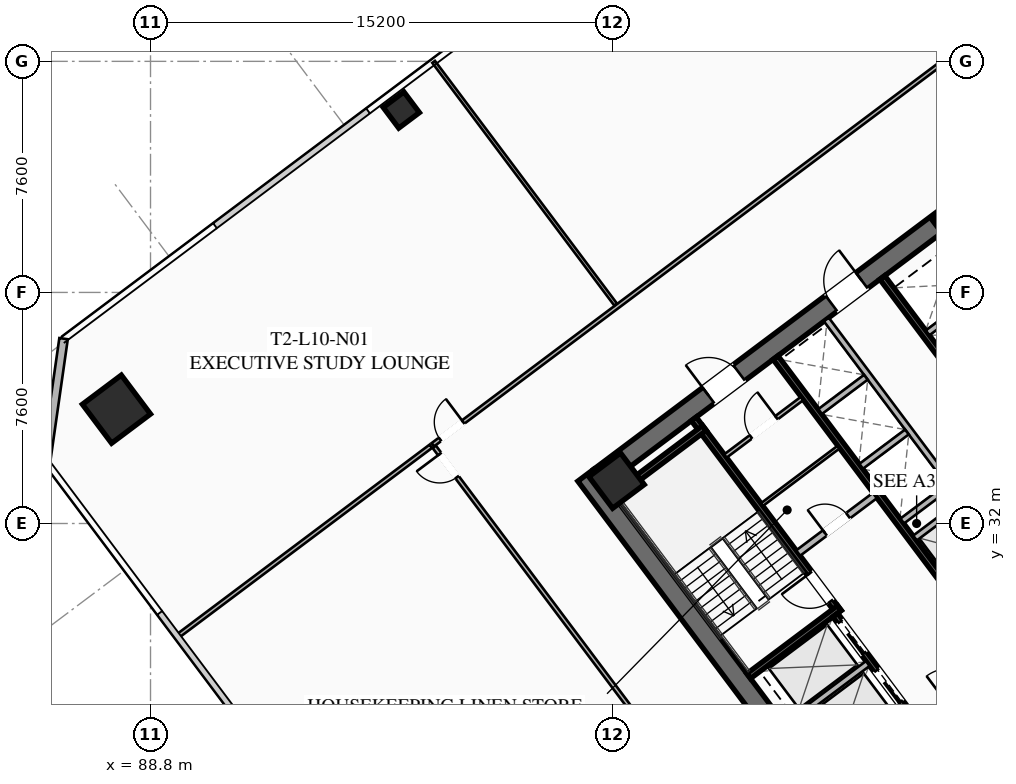
"""IFC4 building model, lengths in metres.
Left out: names, types, materials, properties, quantities, classifications, styles, units other than length and angle.
Written with IfcOpenShell. Run it as: python <this file> out.ifc"""

import sys

from ifc_helpers import new_model, si_unit, direction, frame, frame_2d, origin, origin_2d, place, context, subcontext, project, spatial, rectangle, hollow_rectangle, extrude, element, fill, save


model = new_model("IFC4")
c1 = context("Model", 3, precision=1e-05, world=origin(), true_north=direction((0.0, 1.0)))
c2 = subcontext(c1, "Body", "Model", "MODEL_VIEW")
j1 = project(units=[si_unit("LENGTHUNIT", "METRE"), si_unit("PLANEANGLEUNIT", "RADIAN")], contexts=[c1])
p1 = place(None, origin())
s1 = spatial("IfcSite", under=j1, at=p1, CompositionType="ELEMENT")
p2 = place(p1, origin())
s2 = spatial("IfcBuilding", under=s1, at=p2, CompositionType="ELEMENT")
p3 = place(p2, frame((0.0, 0.0, 42.35)))
s3 = spatial("IfcBuildingStorey", under=s2, at=p3, CompositionType="ELEMENT", Elevation=42.35)
p4 = place(p3, frame((112.476, 21.107, 0.0), z_axis=(0.0, 0.0, 1.0), x_axis=(-0.600005007985, 0.799996243986, 0.0)))
e1 = element("IfcWall", 1, at=p4, inside=s3, PredefinedType="SHEAR", context=c2, shape_type="SweptSolid", body=[
    extrude(rectangle(XDim=15.6, YDim=0.65, at=frame_2d((7.8, 0.0))), origin(), (0.0, 0.0, 1.0), 3.55),
])
p5 = place(p3, frame((124.429, 30.478, 0.0), z_axis=(0.0, 0.0, 1.0), x_axis=(-0.799998028465, -0.600002628705, 0.0)))
e2 = element("IfcWall", 2, at=p5, inside=s3, PredefinedType="SHEAR", context=c2, shape_type="SweptSolid", body=[
    extrude(rectangle(XDim=14.86, YDim=0.65, at=frame_2d((7.43, 0.0))), origin(), (0.0, 0.0, 1.0), 3.55),
])
p6 = place(p5, frame((9.13, 0.0, 0.0)))
e3 = element("IfcOpeningElement", 3, at=p6, cuts=e2, PredefinedType="OPENING", context=c2, shape_type="SweptSolid", body=[
    extrude(rectangle(XDim=1.25, YDim=2.25, at=frame_2d((0.625, 1.125))), frame((0.0, 0.335, 0.0), z_axis=(0.0, -1.0, 0.0), x_axis=(1.0, 0.0, 0.0)), (0.0, 0.0, 1.0), 0.67),
])
p7 = place(p5, frame((4.08, 0.0, 0.0)))
e4 = element("IfcOpeningElement", 4, at=p7, cuts=e2, PredefinedType="OPENING", context=c2, shape_type="SweptSolid", body=[
    extrude(rectangle(XDim=1.25, YDim=2.25, at=frame_2d((0.625, 1.125))), frame((0.0, 0.335, 0.0), z_axis=(0.0, -1.0, 0.0), x_axis=(1.0, 0.0, 0.0)), (0.0, 0.0, 1.0), 0.67),
])
p8 = place(p3, frame((103.571, 33.522, 0.0), z_axis=(0.0, 0.0, 1.0), x_axis=(0.799998028465, 0.600002628705, 0.0)))
e5 = element("IfcWall", 5, at=p8, inside=s3, PredefinedType="SHEAR", context=c2, shape_type="SweptSolid", body=[
    extrude(rectangle(XDim=14.86, YDim=0.65, at=frame_2d((7.43, 0.0))), origin(), (0.0, 0.0, 1.0), 3.55),
])
p9 = place(p8, frame((4.48, 0.0, 0.0)))
e6 = element("IfcOpeningElement", 6, at=p9, cuts=e5, PredefinedType="OPENING", context=c2, shape_type="SweptSolid", body=[
    extrude(rectangle(XDim=1.25, YDim=2.25, at=frame_2d((0.625, 1.125))), frame((0.0, 0.335, 0.0), z_axis=(0.0, -1.0, 0.0), x_axis=(1.0, 0.0, 0.0)), (0.0, 0.0, 1.0), 0.67),
])
p10 = place(p8, frame((9.53, 0.0, 0.0)))
e7 = element("IfcOpeningElement", 7, at=p10, cuts=e5, PredefinedType="OPENING", context=c2, shape_type="SweptSolid", body=[
    extrude(rectangle(XDim=1.25, YDim=2.25, at=frame_2d((0.625, 1.125))), frame((0.0, 0.335, 0.0), z_axis=(0.0, -1.0, 0.0), x_axis=(1.0, 0.0, 0.0)), (0.0, 0.0, 1.0), 0.67),
])
for number, where, z_axis, x_axis in (
    (8, (115.41, 41.87, 0.0), (0.0, 0.0, 1.0), (0.8, 0.6, 0.0)),
    (9, (104.13, 33.41, 0.0), (0.0, 0.0, 1.0), (0.8, 0.6, 0.0)),
):
    element("IfcColumn", number, at=place(p3, frame(where, z_axis=z_axis, x_axis=x_axis)), inside=s3, PredefinedType="COLUMN", context=c2, shape_type="SweptSolid", body=[
        extrude(hollow_rectangle(XDim=1.3, YDim=1.3, WallThickness=0.05, at=origin_2d()), origin(), (0.0, 0.0, 1.0), 3.35),
    ])
p11 = place(p3, frame((87.68, 35.76, 0.0), z_axis=(0.0, 0.0, 1.0), x_axis=(0.799999996291, 0.600000004945, 0.0)))
e10 = element("IfcColumn", 10, at=p11, inside=s3, PredefinedType="COLUMN", context=c2, shape_type="SweptSolid", body=[
    extrude(hollow_rectangle(XDim=1.6, YDim=1.6, WallThickness=0.06, at=origin_2d()), origin(), (0.0, 0.0, 1.0), 3.35),
])
p12 = place(p3, frame((97.05, 45.6, 0.0), z_axis=(0.0, 0.0, 1.0), x_axis=(0.799999996291, 0.600000004945, 0.0)))
e11 = element("IfcColumn", 11, at=p12, inside=s3, PredefinedType="COLUMN", context=c2, shape_type="SweptSolid", body=[
    extrude(hollow_rectangle(XDim=0.85, YDim=0.85, WallThickness=0.035, at=origin_2d()), origin(), (0.0, 0.0, 1.0), 3.35),
])
p13 = place(p3, frame((85.36, 34.02, 0.0), z_axis=(0.0, 0.0, 1.0), x_axis=(0.14137968631, 0.989955445613, 0.0)))
e12 = element("IfcWall", 12, at=p13, inside=s3, PredefinedType="SOLIDWALL", context=c2, shape_type="SweptSolid", body=[
    extrude(rectangle(XDim=4.101, YDim=0.28, at=frame_2d((2.051, 0.0))), origin(), (0.0, 0.0, 1.0), 3.35),
])
p14 = place(p3, frame((111.44, 29.08, 0.0), z_axis=(0.0, 0.0, 1.0), x_axis=(-0.600009827119, 0.799992629566, 0.0)))
e13 = element("IfcWall", 13, at=p14, inside=s3, PredefinedType="SHEAR", context=c2, shape_type="SweptSolid", body=[
    extrude(rectangle(XDim=7.95, YDim=0.2, at=frame_2d((3.975, 0.0))), origin(), (0.0, 0.0, 1.0), 3.35),
])
p15 = place(p14, frame((0.45, 0.0, 0.0)))
e14 = element("IfcOpeningElement", 14, at=p15, cuts=e13, PredefinedType="OPENING", context=c2, shape_type="SweptSolid", body=[
    extrude(rectangle(XDim=1.15, YDim=2.2, at=frame_2d((0.575, 1.1))), frame((0.0, 0.11, 0.0), z_axis=(0.0, -1.0, 0.0), x_axis=(1.0, 0.0, 0.0)), (0.0, 0.0, 1.0), 0.22),
])
for number, where, z_axis, x_axis in (
    (15, (108.476, 26.982, 0.0), (0.0, 0.0, 1.0), (0.8, 0.6, 0.0)),
    (16, (104.036, 32.902, 0.0), (0.0, 0.0, 1.0), (0.8, 0.6, 0.0)),
):
    element("IfcWall", number, at=place(p3, frame(where, z_axis=z_axis, x_axis=x_axis)), inside=s3, PredefinedType="SHEAR", context=c2, shape_type="SweptSolid", body=[
        extrude(rectangle(XDim=3.73, YDim=0.2, at=frame_2d((1.865, 0.0))), origin(), (0.0, 0.0, 1.0), 3.35),
    ])
p16 = place(p3, frame((117.938, 26.016, 0.0), z_axis=(0.0, 0.0, 1.0), x_axis=(-0.600005463273, 0.799995902516, 0.0)))
e17 = element("IfcWall", 17, at=p16, inside=s3, PredefinedType="SHEAR", context=c2, shape_type="SweptSolid", body=[
    extrude(rectangle(XDim=14.3, YDim=0.2, at=frame_2d((7.15, 0.0))), origin(), (0.0, 0.0, 1.0), 3.35),
])
p17 = place(p3, frame((110.104, 31.028, 0.0), z_axis=(0.0, 0.0, 1.0), x_axis=(0.800018601094, 0.59997519774, 0.0)))
e18 = element("IfcWall", 18, at=p17, inside=s3, PredefinedType="SOLIDWALL", context=c2, shape_type="SweptSolid", body=[
    extrude(rectangle(XDim=3.15, YDim=0.22, at=frame_2d((1.575, 0.0))), origin(), (0.0, 0.0, 1.0), 2.703),
])
p18 = place(p17, frame((1.1, 0.0, 0.0)))
e19 = element("IfcOpeningElement", 19, at=p18, cuts=e18, PredefinedType="OPENING", context=c2, shape_type="SweptSolid", body=[
    extrude(rectangle(XDim=0.95, YDim=2.05, at=frame_2d((0.475, 1.025))), frame((0.0, 0.12, 0.0), z_axis=(0.0, -1.0, 0.0), x_axis=(1.0, 0.0, 0.0)), (0.0, 0.0, 1.0), 0.24),
])
p19 = place(p3, frame((114.316, 25.412, 0.0), z_axis=(0.0, 0.0, 1.0), x_axis=(0.800018601094, 0.59997519774, 0.0)))
e20 = element("IfcWall", 20, at=p19, inside=s3, PredefinedType="SOLIDWALL", context=c2, shape_type="SweptSolid", body=[
    extrude(rectangle(XDim=3.15, YDim=0.22, at=frame_2d((1.575, 0.0))), origin(), (0.0, 0.0, 1.0), 2.703),
])
p20 = place(p19, frame((0.95, 0.0, 0.0)))
e21 = element("IfcOpeningElement", 21, at=p20, cuts=e20, PredefinedType="OPENING", context=c2, shape_type="SweptSolid", body=[
    extrude(rectangle(XDim=1.25, YDim=2.25, at=frame_2d((0.625, 1.125))), frame((0.0, 0.12, 0.0), z_axis=(0.0, -1.0, 0.0), x_axis=(1.0, 0.0, 0.0)), (0.0, 0.0, 1.0), 0.24),
])
p21 = place(p3, frame((115.13, 23.91, 0.0), z_axis=(0.0, 0.0, 1.0), x_axis=(-0.599975393228, 0.800018454488, 0.0)))
e22 = element("IfcWall", 22, at=p21, inside=s3, PredefinedType="SHEAR", context=c2, shape_type="SweptSolid", body=[
    extrude(rectangle(XDim=6.35, YDim=0.2, at=frame_2d((3.175, 0.0))), origin(), (0.0, 0.0, 1.0), 3.35),
])
p22 = place(p21, frame((4.775, 0.0, 0.0)))
e23 = element("IfcOpeningElement", 23, at=p22, cuts=e22, PredefinedType="OPENING", context=c2, shape_type="SweptSolid", body=[
    extrude(rectangle(XDim=1.3, YDim=2.25, at=frame_2d((0.65, 1.125))), frame((0.0, 0.11, 0.0), z_axis=(0.0, -1.0, 0.0), x_axis=(1.0, 0.0, 0.0)), (0.0, 0.0, 1.0), 0.22),
])
p23 = place(p21, frame((2.775, 0.0, 0.0)))
e24 = element("IfcOpeningElement", 24, at=p23, cuts=e22, PredefinedType="OPENING", context=c2, shape_type="SweptSolid", body=[
    extrude(rectangle(XDim=1.3, YDim=2.25, at=frame_2d((0.65, 1.125))), frame((0.0, 0.11, 0.0), z_axis=(0.0, -1.0, 0.0), x_axis=(1.0, 0.0, 0.0)), (0.0, 0.0, 1.0), 0.22),
])
p24 = place(p21, frame((0.575, 0.0, 0.0)))
e25 = element("IfcOpeningElement", 25, at=p24, cuts=e22, PredefinedType="OPENING", context=c2, shape_type="SweptSolid", body=[
    extrude(rectangle(XDim=1.3, YDim=2.25, at=frame_2d((0.65, 1.125))), frame((0.0, 0.11, 0.0), z_axis=(0.0, -1.0, 0.0), x_axis=(1.0, 0.0, 0.0)), (0.0, 0.0, 1.0), 0.22),
])
p25 = place(p3, frame((109.688, 25.366, 0.0), z_axis=(0.0, 0.0, 1.0), x_axis=(0.8, 0.6, 0.0)))
e26 = element("IfcWall", 26, at=p25, inside=s3, PredefinedType="SOLIDWALL", context=c2, shape_type="SweptSolid", body=[
    extrude(rectangle(XDim=3.38, YDim=0.2, at=frame_2d((1.69, 0.0))), origin(), (0.0, 0.0, 1.0), 3.35),
])
p26 = place(p3, frame((112.87, 40.09, 0.0), z_axis=(0.0, 0.0, 1.0), x_axis=(0.599975393228, -0.800018454488, 0.0)))
e27 = element("IfcWall", 27, at=p26, inside=s3, PredefinedType="SHEAR", context=c2, shape_type="SweptSolid", body=[
    extrude(rectangle(XDim=6.35, YDim=0.2, at=frame_2d((3.175, 0.0))), origin(), (0.0, 0.0, 1.0), 3.35),
])
p27 = place(p3, frame((114.36, 38.27, 0.0), z_axis=(0.0, 0.0, 1.0), x_axis=(0.799973995579, 0.600034670996, 0.0)))
e28 = element("IfcWall", 28, at=p27, inside=s3, PredefinedType="SOLIDWALL", context=c2, shape_type="SweptSolid", body=[
    extrude(rectangle(XDim=3.38, YDim=0.2, at=frame_2d((1.69, 0.0))), origin(), (0.0, 0.0, 1.0), 3.35),
])
p28 = place(p3, frame((107.71, 34.22, 0.0), z_axis=(0.0, 0.0, 1.0), x_axis=(0.799981399002, 0.60002480053, 0.0)))
e29 = element("IfcWall", 29, at=p28, inside=s3, PredefinedType="PARTITIONING", context=c2, shape_type="SweptSolid", body=[
    extrude(rectangle(XDim=3.15, YDim=0.135, at=frame_2d((1.575, 0.0))), origin(), (0.0, 0.0, 1.0), 2.703),
])
p29 = place(p28, frame((1.05, 0.0, 0.0)))
e30 = element("IfcOpeningElement", 30, at=p29, cuts=e29, PredefinedType="OPENING", context=c2, shape_type="SweptSolid", body=[
    extrude(rectangle(XDim=1.05, YDim=2.2, at=frame_2d((0.525, 1.1))), frame((0.0, 0.077, 0.0), z_axis=(0.0, -1.0, 0.0), x_axis=(1.0, 0.0, 0.0)), (0.0, 0.0, 1.0), 0.155),
])
p30 = place(p3, frame((108.91, 32.62, 0.0), z_axis=(0.0, 0.0, 1.0), x_axis=(0.800018601094, 0.59997519774, 0.0)))
e31 = element("IfcWall", 31, at=p30, inside=s3, PredefinedType="PARTITIONING", context=c2, shape_type="SweptSolid", body=[
    extrude(rectangle(XDim=3.15, YDim=0.11, at=frame_2d((1.575, 0.0))), origin(), (0.0, 0.0, 1.0), 2.703),
])
p31 = place(p3, frame((113.946, 31.522, 0.0), z_axis=(0.0, 0.0, 1.0), x_axis=(0.8, 0.6, 0.0)))
e32 = element("IfcWall", 32, at=p31, inside=s3, PredefinedType="SOLIDWALL", context=c2, shape_type="SweptSolid", body=[
    extrude(rectangle(XDim=1.88, YDim=0.2, at=frame_2d((0.94, 0.0))), origin(), (0.0, 0.0, 1.0), 3.35),
])
p32 = place(p3, frame((115.11, 33.27, 0.0), z_axis=(0.0, 0.0, 1.0), x_axis=(-0.600011488909, 0.79999138319, 0.0)))
e33 = element("IfcWall", 33, at=p32, inside=s3, PredefinedType="SOLIDWALL", context=c2, shape_type="SweptSolid", body=[
    extrude(rectangle(XDim=6.8, YDim=0.2, at=frame_2d((3.4, 0.0))), origin(), (0.0, 0.0, 1.0), 3.35),
])
p33 = place(p3, frame((113.526, 32.082, 0.0), z_axis=(0.0, 0.0, 1.0), x_axis=(0.800046745961, 0.599937666993, 0.0)))
e34 = element("IfcWall", 34, at=p33, inside=s3, PredefinedType="SOLIDWALL", context=c2, shape_type="SweptSolid", body=[
    extrude(rectangle(XDim=1.88, YDim=0.2, at=frame_2d((0.94, 0.0))), origin(), (0.0, 0.0, 1.0), 3.35),
])
p34 = place(p3, frame((112.176, 33.882, 0.0), z_axis=(0.0, 0.0, 1.0), x_axis=(0.8, 0.6, 0.0)))
e35 = element("IfcWall", 35, at=p34, inside=s3, PredefinedType="SOLIDWALL", context=c2, shape_type="SweptSolid", body=[
    extrude(rectangle(XDim=1.88, YDim=0.2, at=frame_2d((0.94, 0.0))), origin(), (0.0, 0.0, 1.0), 3.35),
])
p35 = place(p3, frame((110.826, 35.682, 0.0), z_axis=(0.0, 0.0, 1.0), x_axis=(0.799984418148, 0.600020775241, 0.0)))
e36 = element("IfcWall", 36, at=p35, inside=s3, PredefinedType="SOLIDWALL", context=c2, shape_type="SweptSolid", body=[
    extrude(rectangle(XDim=1.88, YDim=0.2, at=frame_2d((0.94, 0.0))), origin(), (0.0, 0.0, 1.0), 3.35),
])
p36 = place(p3, frame((98.084, 34.588, 0.0), z_axis=(0.0, 0.0, 1.0), x_axis=(0.799997053619, 0.600003928488, 0.0)))
e37 = element("IfcWall", 37, at=p36, inside=s3, PredefinedType="PARTITIONING", context=c2, shape_type="SweptSolid", body=[
    extrude(rectangle(XDim=29.83, YDim=0.135, at=frame_2d((14.915, 0.0))), origin(), (0.0, 0.0, 1.0), 2.703),
])
p37 = place(p36, frame((0.3, 0.0, 0.0)))
e38 = element("IfcOpeningElement", 38, at=p37, cuts=e37, PredefinedType="OPENING", context=c2, shape_type="SweptSolid", body=[
    extrude(rectangle(XDim=0.95, YDim=2.05, at=frame_2d((0.475, 1.025))), frame((0.0, 0.077, 0.0), z_axis=(0.0, -1.0, 0.0), x_axis=(1.0, 0.0, 0.0)), (0.0, 0.0, 1.0), 0.155),
])
p38 = place(p36, frame((28.58, 0.0, 0.0)))
e39 = element("IfcOpeningElement", 39, at=p38, cuts=e37, PredefinedType="OPENING", context=c2, shape_type="SweptSolid", body=[
    extrude(rectangle(XDim=0.95, YDim=2.05, at=frame_2d((0.475, 1.025))), frame((0.0, 0.077, 0.0), z_axis=(0.0, -1.0, 0.0), x_axis=(1.0, 0.0, 0.0)), (0.0, 0.0, 1.0), 0.155),
])
p39 = place(p3, frame((104.1, 39.2, 0.0), z_axis=(0.0, 0.0, 1.0), x_axis=(-0.599996085964, 0.800002935512, 0.0)))
e40 = element("IfcWall", 40, at=p39, inside=s3, PredefinedType="PARTITIONING", context=c2, shape_type="SweptSolid", body=[
    extrude(rectangle(XDim=9.98, YDim=0.11, at=frame_2d((4.99, 0.0))), origin(), (0.0, 0.0, 1.0), 2.703),
])
p40 = place(p3, frame((135.46, 34.47, 0.0), z_axis=(0.0, 0.0, 1.0), x_axis=(-0.800000982127, -0.599998690494, 0.0)))
e41 = element("IfcWall", 41, at=p40, inside=s3, PredefinedType="PARTITIONING", context=c2, shape_type="SweptSolid", body=[
    extrude(rectangle(XDim=29.83, YDim=0.135, at=frame_2d((14.915, 0.0))), origin(), (0.0, 0.0, 1.0), 2.703),
])
p41 = place(p40, frame((28.5, 0.0, 0.0)))
e42 = element("IfcOpeningElement", 42, at=p41, cuts=e41, PredefinedType="OPENING", context=c2, shape_type="SweptSolid", body=[
    extrude(rectangle(XDim=0.95, YDim=2.05, at=frame_2d((0.475, 1.025))), frame((0.0, 0.077, 0.0), z_axis=(0.0, -1.0, 0.0), x_axis=(1.0, 0.0, 0.0)), (0.0, 0.0, 1.0), 0.155),
])
p42 = place(p40, frame((17.901, 0.0, 0.0)))
e43 = element("IfcOpeningElement", 43, at=p42, cuts=e41, PredefinedType="OPENING", context=c2, shape_type="SweptSolid", body=[
    extrude(rectangle(XDim=0.95, YDim=2.05, at=frame_2d((0.475, 1.025))), frame((0.0, 0.077, 0.0), z_axis=(0.0, -1.0, 0.0), x_axis=(1.0, 0.0, 0.0)), (0.0, 0.0, 1.0), 0.155),
])
p43 = place(p40, frame((13.92, 0.0, 0.0)))
e44 = element("IfcOpeningElement", 44, at=p43, cuts=e41, PredefinedType="OPENING", context=c2, shape_type="SweptSolid", body=[
    extrude(rectangle(XDim=0.95, YDim=2.05, at=frame_2d((0.475, 1.025))), frame((0.0, 0.077, 0.0), z_axis=(0.0, -1.0, 0.0), x_axis=(1.0, 0.0, 0.0)), (0.0, 0.0, 1.0), 0.155),
])
p44 = place(p40, frame((0.38, 0.0, 0.0)))
e45 = element("IfcOpeningElement", 45, at=p44, cuts=e41, PredefinedType="OPENING", context=c2, shape_type="SweptSolid", body=[
    extrude(rectangle(XDim=0.95, YDim=2.05, at=frame_2d((0.475, 1.025))), frame((0.0, 0.077, 0.0), z_axis=(0.0, -1.0, 0.0), x_axis=(1.0, 0.0, 0.0)), (0.0, 0.0, 1.0), 0.155),
])
p45 = place(p3, frame((111.548, 16.636, 0.0), z_axis=(0.0, 0.0, 1.0), x_axis=(-0.600001746983, 0.79999868976, 0.0)))
e46 = element("IfcWall", 46, at=p45, inside=s3, PredefinedType="PARTITIONING", context=c2, shape_type="SweptSolid", body=[
    extrude(rectangle(XDim=22.36, YDim=0.135, at=frame_2d((11.18, 0.0))), origin(), (0.0, 0.0, 1.0), 2.703),
])
p46 = place(p45, frame((21.11, 0.0, 0.0)))
e47 = element("IfcOpeningElement", 47, at=p46, cuts=e46, PredefinedType="OPENING", context=c2, shape_type="SweptSolid", body=[
    extrude(rectangle(XDim=0.95, YDim=2.05, at=frame_2d((0.475, 1.025))), frame((0.0, 0.077, 0.0), z_axis=(0.0, -1.0, 0.0), x_axis=(1.0, 0.0, 0.0)), (0.0, 0.0, 1.0), 0.155),
])
p47 = place(p3, frame((98.02, 34.54, 0.0), z_axis=(0.0, 0.0, 1.0), x_axis=(-0.8, -0.6, 0.0)))
e48 = element("IfcWall", 48, at=p47, inside=s3, PredefinedType="PARTITIONING", context=c2, shape_type="SweptSolid", body=[
    extrude(rectangle(XDim=10.42, YDim=0.135, at=frame_2d((5.21, 0.0))), origin(), (0.0, 0.0, 1.0), 2.703),
])
p48 = place(p9, origin())
e49 = element("IfcDoor", 49, at=p48, inside=s3, OperationType="SINGLE_SWING_LEFT", PredefinedType="DOOR", context=c2, shape_type="SweptSolid", body=[
    extrude(rectangle(XDim=1.25, YDim=2.25, at=frame_2d((0.625, 1.125))), frame((0.0, 0.025, 0.0), z_axis=(0.0, -1.0, 0.0), x_axis=(1.0, 0.0, 0.0)), (0.0, 0.0, 1.0), 0.05),
])
fill(e6, e49)
p49 = place(p10, origin())
e50 = element("IfcDoor", 50, at=p49, inside=s3, OperationType="SINGLE_SWING_RIGHT", PredefinedType="DOOR", context=c2, shape_type="SweptSolid", body=[
    extrude(rectangle(XDim=1.25, YDim=2.25, at=frame_2d((0.625, 1.125))), frame((0.0, 0.025, 0.0), z_axis=(0.0, -1.0, 0.0), x_axis=(1.0, 0.0, 0.0)), (0.0, 0.0, 1.0), 0.05),
])
fill(e7, e50)
p50 = place(p15, origin())
e51 = element("IfcDoor", 51, at=p50, inside=s3, OperationType="SINGLE_SWING_RIGHT", PredefinedType="DOOR", context=c2, shape_type="SweptSolid", body=[
    extrude(rectangle(XDim=1.15, YDim=2.2, at=frame_2d((0.575, 1.1))), frame((0.0, 0.025, 0.0), z_axis=(0.0, -1.0, 0.0), x_axis=(1.0, 0.0, 0.0)), (0.0, 0.0, 1.0), 0.05),
])
fill(e14, e51)
p51 = place(p29, origin())
e52 = element("IfcDoor", 52, at=p51, inside=s3, OperationType="SINGLE_SWING_RIGHT", PredefinedType="DOOR", context=c2, shape_type="SweptSolid", body=[
    extrude(rectangle(XDim=1.05, YDim=2.2, at=frame_2d((0.525, 1.1))), frame((0.0, 0.025, 0.0), z_axis=(0.0, -1.0, 0.0), x_axis=(1.0, 0.0, 0.0)), (0.0, 0.0, 1.0), 0.05),
])
fill(e30, e52)
p52 = place(p18, origin())
e53 = element("IfcDoor", 53, at=p52, inside=s3, OperationType="SINGLE_SWING_LEFT", PredefinedType="DOOR", context=c2, shape_type="SweptSolid", body=[
    extrude(rectangle(XDim=0.95, YDim=2.05, at=frame_2d((0.475, 1.025))), frame((0.0, 0.025, 0.0), z_axis=(0.0, -1.0, 0.0), x_axis=(1.0, 0.0, 0.0)), (0.0, 0.0, 1.0), 0.05),
])
fill(e19, e53)
p53 = place(p37, origin())
e54 = element("IfcDoor", 54, at=p53, inside=s3, OperationType="SINGLE_SWING_RIGHT", PredefinedType="DOOR", context=c2, shape_type="SweptSolid", body=[
    extrude(rectangle(XDim=0.95, YDim=2.05, at=frame_2d((0.475, 1.025))), frame((0.0, 0.025, 0.0), z_axis=(0.0, -1.0, 0.0), x_axis=(1.0, 0.0, 0.0)), (0.0, 0.0, 1.0), 0.05),
])
fill(e38, e54)
p54 = place(p46, origin())
e55 = element("IfcDoor", 55, at=p54, inside=s3, OperationType="SINGLE_SWING_RIGHT", PredefinedType="DOOR", context=c2, shape_type="SweptSolid", body=[
    extrude(rectangle(XDim=0.95, YDim=2.05, at=frame_2d((0.475, 1.025))), frame((0.0, 0.025, 0.0), z_axis=(0.0, -1.0, 0.0), x_axis=(1.0, 0.0, 0.0)), (0.0, 0.0, 1.0), 0.05),
])
fill(e47, e55)
p55 = place(p22, origin())
e56 = element("IfcDoor", 56, at=p55, inside=s3, OperationType="SLIDING_TO_LEFT", PredefinedType="DOOR", context=c2, shape_type="SweptSolid", body=[
    extrude(rectangle(XDim=1.3, YDim=2.25, at=frame_2d((0.65, 1.125))), frame((0.0, 0.025, 0.0), z_axis=(0.0, -1.0, 0.0), x_axis=(1.0, 0.0, 0.0)), (0.0, 0.0, 1.0), 0.05),
])
fill(e23, e56)
p56 = place(p23, origin())
e57 = element("IfcDoor", 57, at=p56, inside=s3, OperationType="SLIDING_TO_LEFT", PredefinedType="DOOR", context=c2, shape_type="SweptSolid", body=[
    extrude(rectangle(XDim=1.3, YDim=2.25, at=frame_2d((0.65, 1.125))), frame((0.0, 0.025, 0.0), z_axis=(0.0, -1.0, 0.0), x_axis=(1.0, 0.0, 0.0)), (0.0, 0.0, 1.0), 0.05),
])
fill(e24, e57)
save(model, sys.argv[1])
